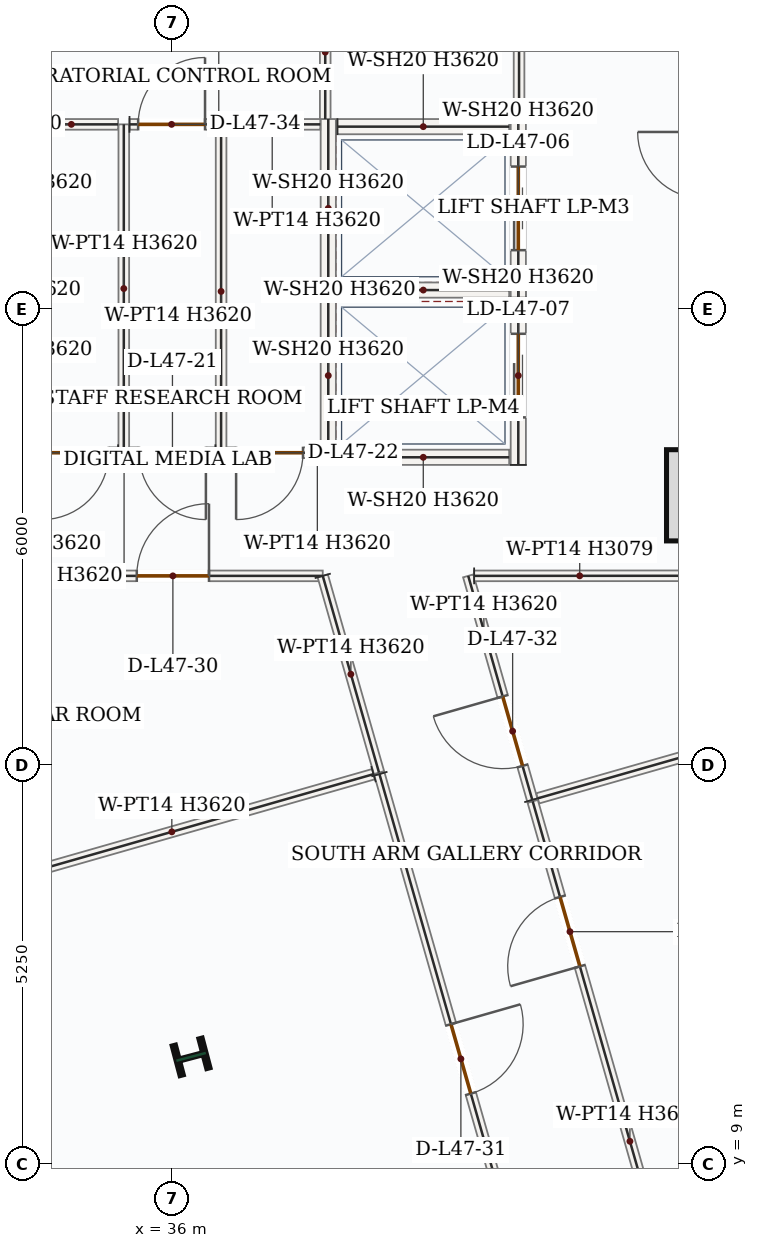
"""IFC4 building model, lengths in metres.
Left out: names, types, materials, properties, quantities, classifications, styles, units other than length and angle.
Written with IfcOpenShell. Run it as: python <this file> out.ifc"""

import sys

from ifc_helpers import new_model, si_unit, direction, frame, frame_2d, origin, origin_2d, place, context, subcontext, project, spatial, rectangle, i_section, extrude, source, transform, mapped, element, fill, save


model = new_model("IFC4")
c1 = context("Model", 3, precision=1e-05, world=origin(), true_north=direction((0.0, 1.0)))
c2 = subcontext(c1, "Body", "Model", "MODEL_VIEW")
j1 = project(units=[si_unit("LENGTHUNIT", "METRE"), si_unit("PLANEANGLEUNIT", "RADIAN")], contexts=[c1])
p1 = place(None, origin())
s1 = spatial("IfcSite", under=j1, at=p1, CompositionType="ELEMENT")
p2 = place(p1, origin())
s2 = spatial("IfcBuilding", under=s1, at=p2, CompositionType="ELEMENT")
p3 = place(p2, frame((0.0, 0.0, 201.9)))
s3 = spatial("IfcBuildingStorey", under=s2, at=p3, CompositionType="ELEMENT", Elevation=201.9)
m1 = source(origin(), c2, "Body", "SweptSolid", [
    extrude(rectangle(XDim=1.2, YDim=1.2, at=origin_2d()), origin(), (0.0, 0.0, 1.0), 3.9),
])
p4 = place(p3, frame((43.1, 17.8, 0.0), z_axis=(0.0, 0.0, 1.0), x_axis=(1.0, 0.0, 0.0)))
e1 = element("IfcColumn", 1, at=p4, inside=s3, PredefinedType="COLUMN", context=c2, shape_type="MappedRepresentation", body=[
    mapped(m1, transform((0.0, 0.0, 0.0), x_axis=(1.0, 0.0, 0.0), y_axis=(0.0, 1.0, 0.0), z_axis=(0.0, 0.0, 1.0), scale=1.0)),
])
m2 = source(origin(), c2, "Body", "SweptSolid", [
    extrude(i_section(OverallWidth=0.404, OverallDepth=0.407, WebThickness=0.027, FlangeThickness=0.044, FilletRadius=0.018, at=origin_2d()), origin(), (0.0, 0.0, 1.0), 3.9),
])
p5 = place(p3, frame((36.245, 10.412, 0.0), z_axis=(0.0, 0.0, 1.0), x_axis=(-0.255445757936, 0.966823388604, 0.0)))
e2 = element("IfcColumn", 2, at=p5, inside=s3, PredefinedType="COLUMN", context=c2, shape_type="MappedRepresentation", body=[
    mapped(m2, transform((0.0, 0.0, 0.0), x_axis=(1.0, 0.0, 0.0), y_axis=(0.0, 1.0, 0.0), z_axis=(0.0, 0.0, 1.0), scale=1.0)),
])
p6 = place(p3, frame((34.92, 6.555, 0.0), z_axis=(0.0, 0.0, 1.0), x_axis=(-0.27496352843, 0.961454657295, 0.0)))
e3 = element("IfcWall", 3, at=p6, inside=s3, PredefinedType="SOLIDWALL", context=c2, shape_type="SweptSolid", body=[
    extrude(rectangle(XDim=8.513, YDim=0.28, at=frame_2d((4.257, 0.0))), origin(), (0.0, 0.0, 1.0), 3.62),
])
p7 = place(p6, frame((3.357, 0.0, 0.85)))
e4 = element("IfcOpeningElement", 4, at=p7, cuts=e3, PredefinedType="OPENING", context=c2, shape_type="SweptSolid", body=[
    extrude(rectangle(XDim=1.8, YDim=1.75, at=frame_2d((0.9, 0.875))), frame((0.0, 0.15, 0.0), z_axis=(0.0, -1.0, 0.0), x_axis=(1.0, 0.0, 0.0)), (0.0, 0.0, 1.0), 0.3),
])
m3 = source(origin(), c2, "Body", "SweptSolid", [
    extrude(rectangle(XDim=2.35, YDim=0.2, at=frame_2d((1.175, 0.0))), origin(), (0.0, 0.0, 1.0), 3.62),
])
p8 = place(p3, frame((38.05, 20.4, 0.0), z_axis=(0.0, 0.0, 1.0), x_axis=(0.0, 1.0, 0.0)))
e5 = element("IfcWall", 5, at=p8, inside=s3, PredefinedType="SOLIDWALL", context=c2, shape_type="MappedRepresentation", body=[
    mapped(m3, transform((0.0, 0.0, 0.0), x_axis=(1.0, 0.0, 0.0), y_axis=(0.0, 1.0, 0.0), z_axis=(0.0, 0.0, 1.0), scale=1.0)),
])
p9 = place(p3, frame((40.55, 20.4, 0.0), z_axis=(0.0, 0.0, 1.0), x_axis=(0.0, 1.0, 0.0)))
e6 = element("IfcWall", 6, at=p9, inside=s3, PredefinedType="SOLIDWALL", context=c2, shape_type="SweptSolid", body=[
    extrude(rectangle(XDim=2.35, YDim=0.2, at=frame_2d((1.175, 0.0))), origin(), (0.0, 0.0, 1.0), 3.62),
])
p10 = place(p9, frame((0.625, 0.0, 0.0)))
e7 = element("IfcOpeningElement", 7, at=p10, cuts=e6, PredefinedType="OPENING", context=c2, shape_type="SweptSolid", body=[
    extrude(rectangle(XDim=1.1, YDim=2.15, at=frame_2d((0.55, 1.075))), frame((0.0, 0.11, 0.0), z_axis=(0.0, -1.0, 0.0), x_axis=(1.0, 0.0, 0.0)), (0.0, 0.0, 1.0), 0.22),
])
m4 = source(origin(), c2, "Body", "SweptSolid", [
    extrude(rectangle(XDim=2.26, YDim=0.2, at=frame_2d((1.13, 0.0))), origin(), (0.0, 0.0, 1.0), 3.62),
])
for number, where, z_axis, x_axis in (
    (8, (38.17, 20.5, 0.0), (0.0, 0.0, 1.0), (1.0, 0.0, 0.0)),
    (9, (38.17, 22.65, 0.0), (0.0, 0.0, 1.0), (1.0, 0.0, 0.0)),
):
    element("IfcWall", number, at=place(p3, frame(where, z_axis=z_axis, x_axis=x_axis)), inside=s3, PredefinedType="SOLIDWALL", context=c2, shape_type="MappedRepresentation", body=[
        mapped(m4, transform((0.0, 0.0, 0.0), x_axis=(1.0, 0.0, 0.0), y_axis=(0.0, 1.0, 0.0), z_axis=(0.0, 0.0, 1.0), scale=1.0)),
    ])
p11 = place(p3, frame((38.05, 18.2, 0.0), z_axis=(0.0, 0.0, 1.0), x_axis=(0.0, 1.0, 0.0)))
e10 = element("IfcWall", 10, at=p11, inside=s3, PredefinedType="SOLIDWALL", context=c2, shape_type="MappedRepresentation", body=[
    mapped(m3, transform((0.0, 0.0, 0.0), x_axis=(1.0, 0.0, 0.0), y_axis=(0.0, 1.0, 0.0), z_axis=(0.0, 0.0, 1.0), scale=1.0)),
])
p12 = place(p3, frame((40.55, 18.2, 0.0), z_axis=(0.0, 0.0, 1.0), x_axis=(0.0, 1.0, 0.0)))
e11 = element("IfcWall", 11, at=p12, inside=s3, PredefinedType="SOLIDWALL", context=c2, shape_type="SweptSolid", body=[
    extrude(rectangle(XDim=2.35, YDim=0.2, at=frame_2d((1.175, 0.0))), origin(), (0.0, 0.0, 1.0), 3.62),
])
p13 = place(p12, frame((0.625, 0.0, 0.0)))
e12 = element("IfcOpeningElement", 12, at=p13, cuts=e11, PredefinedType="OPENING", context=c2, shape_type="SweptSolid", body=[
    extrude(rectangle(XDim=1.1, YDim=2.15, at=frame_2d((0.55, 1.075))), frame((0.0, 0.11, 0.0), z_axis=(0.0, -1.0, 0.0), x_axis=(1.0, 0.0, 0.0)), (0.0, 0.0, 1.0), 0.22),
])
p14 = place(p3, frame((38.17, 18.3, 0.0), z_axis=(0.0, 0.0, 1.0), x_axis=(1.0, 0.0, 0.0)))
e13 = element("IfcWall", 13, at=p14, inside=s3, PredefinedType="SOLIDWALL", context=c2, shape_type="MappedRepresentation", body=[
    mapped(m4, transform((0.0, 0.0, 0.0), x_axis=(1.0, 0.0, 0.0), y_axis=(0.0, 1.0, 0.0), z_axis=(0.0, 0.0, 1.0), scale=1.0)),
])
m5 = source(origin(), c2, "Body", "SweptSolid", [
    extrude(rectangle(XDim=4.32, YDim=0.14, at=frame_2d((2.16, 0.0))), origin(), (0.0, 0.0, 1.0), 3.62),
])
p15 = place(p3, frame((35.36, 18.36, 0.0), z_axis=(0.0, 0.0, 1.0), x_axis=(0.0, 1.0, 0.0)))
e14 = element("IfcWall", 14, at=p15, inside=s3, PredefinedType="PARTITIONING", context=c2, shape_type="MappedRepresentation", body=[
    mapped(m5, transform((0.0, 0.0, 0.0), x_axis=(1.0, 0.0, 0.0), y_axis=(0.0, 1.0, 0.0), z_axis=(0.0, 0.0, 1.0), scale=1.0)),
])
p16 = place(p3, frame((35.435, 22.68, 0.0), z_axis=(0.0, 0.0, 1.0), x_axis=(1.0, 0.0, 0.0)))
e15 = element("IfcWall", 15, at=p16, inside=s3, PredefinedType="PARTITIONING", context=c2, shape_type="SweptSolid", body=[
    extrude(rectangle(XDim=1.205, YDim=0.14, at=frame_2d((0.603, 0.0))), origin(), (0.0, 0.0, 1.0), 3.62),
])
p17 = place(p16, frame((0.114, 0.0, 0.0)))
e16 = element("IfcOpeningElement", 16, at=p17, cuts=e15, PredefinedType="OPENING", context=c2, shape_type="SweptSolid", body=[
    extrude(rectangle(XDim=0.88, YDim=2.1, at=frame_2d((0.44, 1.05))), frame((0.0, 0.08, 0.0), z_axis=(0.0, -1.0, 0.0), x_axis=(1.0, 0.0, 0.0)), (0.0, 0.0, 1.0), 0.16),
])
m6 = source(origin(), c2, "Body", "SweptSolid", [
    extrude(rectangle(XDim=4.245, YDim=0.14, at=frame_2d((2.123, 0.0))), origin(), (0.0, 0.0, 1.0), 3.62),
])
p18 = place(p3, frame((36.64, 22.605, 0.0), z_axis=(0.0, 0.0, 1.0), x_axis=(0.0, -1.0, 0.0)))
e17 = element("IfcWall", 17, at=p18, inside=s3, PredefinedType="PARTITIONING", context=c2, shape_type="MappedRepresentation", body=[
    mapped(m6, transform((0.0, 0.0, 0.0), x_axis=(1.0, 0.0, 0.0), y_axis=(0.0, 1.0, 0.0), z_axis=(0.0, 0.0, 1.0), scale=1.0)),
])
p19 = place(p3, frame((36.565, 18.36, 0.0), z_axis=(0.0, 0.0, 1.0), x_axis=(-1.0, 0.0, 0.0)))
e18 = element("IfcWall", 18, at=p19, inside=s3, PredefinedType="PARTITIONING", context=c2, shape_type="SweptSolid", body=[
    extrude(rectangle(XDim=1.13, YDim=0.14, at=frame_2d((0.565, 0.0))), origin(), (0.0, 0.0, 1.0), 3.62),
])
p20 = place(p19, frame((0.125, 0.0, 0.0)))
e19 = element("IfcOpeningElement", 19, at=p20, cuts=e18, PredefinedType="OPENING", context=c2, shape_type="SweptSolid", body=[
    extrude(rectangle(XDim=0.88, YDim=2.1, at=frame_2d((0.44, 1.05))), frame((0.0, 0.08, 0.0), z_axis=(0.0, -1.0, 0.0), x_axis=(1.0, 0.0, 0.0)), (0.0, 0.0, 1.0), 0.16),
])
m7 = source(origin(), c2, "Body", "SweptSolid", [
    extrude(rectangle(XDim=1.23, YDim=0.14, at=frame_2d((0.615, 0.0))), origin(), (0.0, 0.0, 1.0), 3.62),
])
p21 = place(p3, frame((34.055, 22.68, 0.0), z_axis=(0.0, 0.0, 1.0), x_axis=(1.0, 0.0, 0.0)))
e20 = element("IfcWall", 20, at=p21, inside=s3, PredefinedType="PARTITIONING", context=c2, shape_type="MappedRepresentation", body=[
    mapped(m7, transform((0.0, 0.0, 0.0), x_axis=(1.0, 0.0, 0.0), y_axis=(0.0, 1.0, 0.0), z_axis=(0.0, 0.0, 1.0), scale=1.0)),
])
p22 = place(p3, frame((35.285, 18.36, 0.0), z_axis=(0.0, 0.0, 1.0), x_axis=(-1.0, 0.0, 0.0)))
e21 = element("IfcWall", 21, at=p22, inside=s3, PredefinedType="PARTITIONING", context=c2, shape_type="SweptSolid", body=[
    extrude(rectangle(XDim=1.23, YDim=0.14, at=frame_2d((0.615, 0.0))), origin(), (0.0, 0.0, 1.0), 3.62),
])
p23 = place(p22, frame((0.123, 0.0, 0.0)))
e22 = element("IfcOpeningElement", 22, at=p23, cuts=e21, PredefinedType="OPENING", context=c2, shape_type="SweptSolid", body=[
    extrude(rectangle(XDim=0.88, YDim=2.1, at=frame_2d((0.44, 1.05))), frame((0.0, 0.08, 0.0), z_axis=(0.0, -1.0, 0.0), x_axis=(1.0, 0.0, 0.0)), (0.0, 0.0, 1.0), 0.16),
])
m8 = source(origin(), c2, "Body", "SweptSolid", [
    extrude(rectangle(XDim=1.265, YDim=0.14, at=frame_2d((0.633, 0.0))), origin(), (0.0, 0.0, 1.0), 3.62),
])
p24 = place(p3, frame((36.68, 22.68, 0.0), z_axis=(0.0, 0.0, 1.0), x_axis=(1.0, 0.0, 0.0)))
e23 = element("IfcWall", 23, at=p24, inside=s3, PredefinedType="PARTITIONING", context=c2, shape_type="MappedRepresentation", body=[
    mapped(m8, transform((0.0, 0.0, 0.0), x_axis=(1.0, 0.0, 0.0), y_axis=(0.0, 1.0, 0.0), z_axis=(0.0, 0.0, 1.0), scale=1.0)),
])
p25 = place(p3, frame((37.945, 18.36, 0.0), z_axis=(0.0, 0.0, 1.0), x_axis=(-1.0, 0.0, 0.0)))
e24 = element("IfcWall", 24, at=p25, inside=s3, PredefinedType="PARTITIONING", context=c2, shape_type="SweptSolid", body=[
    extrude(rectangle(XDim=1.23, YDim=0.14, at=frame_2d((0.615, 0.0))), origin(), (0.0, 0.0, 1.0), 3.62),
])
p26 = place(p25, frame((0.228, 0.0, 0.0)))
e25 = element("IfcOpeningElement", 25, at=p26, cuts=e24, PredefinedType="OPENING", context=c2, shape_type="SweptSolid", body=[
    extrude(rectangle(XDim=0.88, YDim=2.1, at=frame_2d((0.44, 1.05))), frame((0.0, 0.08, 0.0), z_axis=(0.0, -1.0, 0.0), x_axis=(1.0, 0.0, 0.0)), (0.0, 0.0, 1.0), 0.16),
])
m9 = source(origin(), c2, "Body", "SweptSolid", [
    extrude(rectangle(XDim=1.76, YDim=0.14, at=frame_2d((0.88, 0.0))), origin(), (0.0, 0.0, 1.0), 3.62),
])
p27 = place(p3, frame((38.01, 24.51, 0.0), z_axis=(0.0, 0.0, 1.0), x_axis=(0.0, -1.0, 0.0)))
e26 = element("IfcWall", 26, at=p27, inside=s3, PredefinedType="PARTITIONING", context=c2, shape_type="MappedRepresentation", body=[
    mapped(m9, transform((0.0, 0.0, 0.0), x_axis=(1.0, 0.0, 0.0), y_axis=(0.0, 1.0, 0.0), z_axis=(0.0, 0.0, 1.0), scale=1.0)),
])
m10 = source(origin(), c2, "Body", "SweptSolid", [
    extrude(rectangle(XDim=3.035, YDim=0.14, at=frame_2d((1.518, 0.0))), origin(), (0.0, 0.0, 1.0), 3.62),
])
p28 = place(p3, frame((40.56, 25.785, 0.0), z_axis=(0.0, 0.0, 1.0), x_axis=(0.0, -1.0, 0.0)))
e27 = element("IfcWall", 27, at=p28, inside=s3, PredefinedType="PARTITIONING", context=c2, shape_type="MappedRepresentation", body=[
    mapped(m10, transform((0.0, 0.0, 0.0), x_axis=(1.0, 0.0, 0.0), y_axis=(0.0, 1.0, 0.0), z_axis=(0.0, 0.0, 1.0), scale=1.0)),
])
p29 = place(p3, frame((40.734, 13.792, 0.0), z_axis=(0.0, 0.0, 1.0), x_axis=(-0.274984067599, 0.961448783122, 0.0)))
e28 = element("IfcWall", 28, at=p29, inside=s3, PredefinedType="PARTITIONING", context=c2, shape_type="SweptSolid", body=[
    extrude(rectangle(XDim=3.066, YDim=0.14, at=frame_2d((1.533, 0.0))), origin(), (0.0, 0.0, 1.0), 3.62),
])
p30 = place(p29, frame((0.465, 0.0, 0.0)))
e29 = element("IfcOpeningElement", 29, at=p30, cuts=e28, PredefinedType="OPENING", context=c2, shape_type="SweptSolid", body=[
    extrude(rectangle(XDim=0.95, YDim=2.15, at=frame_2d((0.475, 1.075))), frame((0.0, 0.08, 0.0), z_axis=(0.0, -1.0, 0.0), x_axis=(1.0, 0.0, 0.0)), (0.0, 0.0, 1.0), 0.16),
])
m11 = source(origin(), c2, "Body", "SweptSolid", [
    extrude(rectangle(XDim=2.778, YDim=0.14, at=frame_2d((1.389, 0.0))), origin(), (0.0, 0.0, 1.0), 3.079),
])
p31 = place(p3, frame((39.969, 16.74, 0.0), z_axis=(0.0, 0.0, 1.0), x_axis=(0.999999903427, 0.000439483125, 0.0)))
e30 = element("IfcWall", 30, at=p31, inside=s3, PredefinedType="PARTITIONING", context=c2, shape_type="MappedRepresentation", body=[
    mapped(m11, transform((0.0, 0.0, 0.0), x_axis=(1.0, 0.0, 0.0), y_axis=(0.0, 1.0, 0.0), z_axis=(0.0, 0.0, 1.0), scale=1.0)),
])
m12 = source(origin(), c2, "Body", "SweptSolid", [
    extrude(rectangle(XDim=10.785, YDim=0.14, at=frame_2d((5.393, 0.0))), origin(), (0.0, 0.0, 1.0), 3.079),
])
p32 = place(p3, frame((51.176, 16.779, 0.0), z_axis=(0.0, 0.0, 1.0), x_axis=(-0.961454726908, -0.274963285016, 0.0)))
e31 = element("IfcWall", 31, at=p32, inside=s3, PredefinedType="PARTITIONING", context=c2, shape_type="MappedRepresentation", body=[
    mapped(m12, transform((0.0, 0.0, 0.0), x_axis=(1.0, 0.0, 0.0), y_axis=(0.0, 1.0, 0.0), z_axis=(0.0, 0.0, 1.0), scale=1.0)),
])
p33 = place(p3, frame((30.225, 16.74, 0.0), z_axis=(0.0, 0.0, 1.0), x_axis=(1.0, 0.0, 0.0)))
e32 = element("IfcWall", 32, at=p33, inside=s3, PredefinedType="PARTITIONING", context=c2, shape_type="SweptSolid", body=[
    extrude(rectangle(XDim=7.753, YDim=0.14, at=frame_2d((3.876, 0.0))), origin(), (0.0, 0.0, 1.0), 3.62),
])
p34 = place(p33, frame((5.306, 0.0, 0.0)))
e33 = element("IfcOpeningElement", 33, at=p34, cuts=e32, PredefinedType="OPENING", context=c2, shape_type="SweptSolid", body=[
    extrude(rectangle(XDim=0.95, YDim=2.15, at=frame_2d((0.475, 1.075))), frame((0.0, 0.08, 0.0), z_axis=(0.0, -1.0, 0.0), x_axis=(1.0, 0.0, 0.0)), (0.0, 0.0, 1.0), 0.16),
])
m13 = source(origin(), c2, "Body", "SweptSolid", [
    extrude(rectangle(XDim=2.692, YDim=0.14, at=frame_2d((1.346, 0.0))), origin(), (0.0, 0.0, 1.0), 3.62),
])
p35 = place(p3, frame((37.977, 16.74, 0.0), z_axis=(0.0, 0.0, 1.0), x_axis=(0.27500862401, -0.961441759401, 0.0)))
e34 = element("IfcWall", 34, at=p35, inside=s3, PredefinedType="PARTITIONING", context=c2, shape_type="MappedRepresentation", body=[
    mapped(m13, transform((0.0, 0.0, 0.0), x_axis=(1.0, 0.0, 0.0), y_axis=(0.0, 1.0, 0.0), z_axis=(0.0, 0.0, 1.0), scale=1.0)),
])
m14 = source(origin(), c2, "Body", "SweptSolid", [
    extrude(rectangle(XDim=5.52, YDim=0.14, at=frame_2d((2.76, 0.0))), origin(), (0.0, 0.0, 1.0), 3.62),
])
p36 = place(p3, frame((38.646, 14.131, 0.0), z_axis=(0.0, 0.0, 1.0), x_axis=(-0.961455490798, -0.274960613933, 0.0)))
e35 = element("IfcWall", 35, at=p36, inside=s3, PredefinedType="PARTITIONING", context=c2, shape_type="MappedRepresentation", body=[
    mapped(m14, transform((0.0, 0.0, 0.0), x_axis=(1.0, 0.0, 0.0), y_axis=(0.0, 1.0, 0.0), z_axis=(0.0, 0.0, 1.0), scale=1.0)),
])
p37 = place(p3, frame((42.635, 7.144, 0.0), z_axis=(0.0, 0.0, 1.0), x_axis=(-0.274973646468, 0.96145176361, 0.0)))
e36 = element("IfcWall", 36, at=p37, inside=s3, PredefinedType="PARTITIONING", context=c2, shape_type="SweptSolid", body=[
    extrude(rectangle(XDim=6.895, YDim=0.14, at=frame_2d((3.448, 0.0))), origin(), (0.0, 0.0, 1.0), 3.62),
])
p38 = place(p37, frame((4.637, 0.0, 0.0)))
e37 = element("IfcOpeningElement", 37, at=p38, cuts=e36, PredefinedType="OPENING", context=c2, shape_type="SweptSolid", body=[
    extrude(rectangle(XDim=0.95, YDim=2.15, at=frame_2d((0.475, 1.075))), frame((0.0, 0.08, 0.0), z_axis=(0.0, -1.0, 0.0), x_axis=(1.0, 0.0, 0.0)), (0.0, 0.0, 1.0), 0.16),
])
p39 = place(p3, frame((38.723, 14.133, 0.0), z_axis=(0.0, 0.0, 1.0), x_axis=(0.274985856522, -0.96144827147, 0.0)))
e38 = element("IfcWall", 38, at=p39, inside=s3, PredefinedType="PARTITIONING", context=c2, shape_type="SweptSolid", body=[
    extrude(rectangle(XDim=7.795, YDim=0.14, at=frame_2d((3.897, 0.0))), origin(), (0.0, 0.0, 1.0), 3.62),
])
p40 = place(p39, frame((3.423, 0.0, 0.0)))
e39 = element("IfcOpeningElement", 39, at=p40, cuts=e38, PredefinedType="OPENING", context=c2, shape_type="SweptSolid", body=[
    extrude(rectangle(XDim=0.95, YDim=2.15, at=frame_2d((0.475, 1.075))), frame((0.0, 0.08, 0.0), z_axis=(0.0, -1.0, 0.0), x_axis=(1.0, 0.0, 0.0)), (0.0, 0.0, 1.0), 0.16),
])
m15 = source(origin(), c2, "Body", "SweptSolid", [
    extrude(rectangle(XDim=1.1, YDim=2.15, at=frame_2d((0.55, 1.075))), frame((0.0, 0.025, 0.0), z_axis=(0.0, -1.0, 0.0), x_axis=(1.0, 0.0, 0.0)), (0.0, 0.0, 1.0), 0.05),
])
p41 = place(p10, origin())
e40 = element("IfcDoor", 40, at=p41, inside=s3, OperationType="DOUBLE_DOOR_SLIDING", PredefinedType="DOOR", context=c2, shape_type="MappedRepresentation", body=[
    mapped(m15, transform((0.0, 0.0, 0.0), x_axis=(1.0, 0.0, 0.0), y_axis=(0.0, 1.0, 0.0), z_axis=(0.0, 0.0, 1.0), scale=1.0)),
])
fill(e7, e40)
p42 = place(p13, origin())
e41 = element("IfcDoor", 41, at=p42, inside=s3, OperationType="DOUBLE_DOOR_SLIDING", PredefinedType="DOOR", context=c2, shape_type="MappedRepresentation", body=[
    mapped(m15, transform((0.0, 0.0, 0.0), x_axis=(1.0, 0.0, 0.0), y_axis=(0.0, 1.0, 0.0), z_axis=(0.0, 0.0, 1.0), scale=1.0)),
])
fill(e12, e41)
m16 = source(origin(), c2, "Body", "SweptSolid", [
    extrude(rectangle(XDim=0.88, YDim=2.1, at=frame_2d((0.44, 1.05))), frame((0.0, 0.025, 0.0), z_axis=(0.0, -1.0, 0.0), x_axis=(1.0, 0.0, 0.0)), (0.0, 0.0, 1.0), 0.05),
])
p43 = place(p23, origin())
e42 = element("IfcDoor", 42, at=p43, inside=s3, OperationType="SINGLE_SWING_RIGHT", PredefinedType="DOOR", context=c2, shape_type="MappedRepresentation", body=[
    mapped(m16, transform((0.0, 0.0, 0.0), x_axis=(1.0, 0.0, 0.0), y_axis=(0.0, 1.0, 0.0), z_axis=(0.0, 0.0, 1.0), scale=1.0)),
])
fill(e22, e42)
p44 = place(p20, origin())
e43 = element("IfcDoor", 43, at=p44, inside=s3, OperationType="SINGLE_SWING_LEFT", PredefinedType="DOOR", context=c2, shape_type="MappedRepresentation", body=[
    mapped(m16, transform((0.0, 0.0, 0.0), x_axis=(1.0, 0.0, 0.0), y_axis=(0.0, 1.0, 0.0), z_axis=(0.0, 0.0, 1.0), scale=1.0)),
])
fill(e19, e43)
p45 = place(p26, origin())
e44 = element("IfcDoor", 44, at=p45, inside=s3, OperationType="SINGLE_SWING_RIGHT", PredefinedType="DOOR", context=c2, shape_type="MappedRepresentation", body=[
    mapped(m16, transform((0.0, 0.0, 0.0), x_axis=(1.0, 0.0, 0.0), y_axis=(0.0, 1.0, 0.0), z_axis=(0.0, 0.0, 1.0), scale=1.0)),
])
fill(e25, e44)
m17 = source(origin(), c2, "Body", "SweptSolid", [
    extrude(rectangle(XDim=0.95, YDim=2.15, at=frame_2d((0.475, 1.075))), frame((0.0, 0.025, 0.0), z_axis=(0.0, -1.0, 0.0), x_axis=(1.0, 0.0, 0.0)), (0.0, 0.0, 1.0), 0.05),
])
p46 = place(p34, origin())
e45 = element("IfcDoor", 45, at=p46, inside=s3, OperationType="SINGLE_SWING_RIGHT", PredefinedType="DOOR", context=c2, shape_type="MappedRepresentation", body=[
    mapped(m17, transform((0.0, 0.0, 0.0), x_axis=(1.0, 0.0, 0.0), y_axis=(0.0, 1.0, 0.0), z_axis=(0.0, 0.0, 1.0), scale=1.0)),
])
fill(e33, e45)
p47 = place(p40, origin())
e46 = element("IfcDoor", 46, at=p47, inside=s3, OperationType="SINGLE_SWING_LEFT", PredefinedType="DOOR", context=c2, shape_type="MappedRepresentation", body=[
    mapped(m17, transform((0.0, 0.0, 0.0), x_axis=(1.0, 0.0, 0.0), y_axis=(0.0, 1.0, 0.0), z_axis=(0.0, 0.0, 1.0), scale=1.0)),
])
fill(e39, e46)
p48 = place(p30, origin())
e47 = element("IfcDoor", 47, at=p48, inside=s3, OperationType="SINGLE_SWING_RIGHT", PredefinedType="DOOR", context=c2, shape_type="MappedRepresentation", body=[
    mapped(m17, transform((0.0, 0.0, 0.0), x_axis=(1.0, 0.0, 0.0), y_axis=(0.0, 1.0, 0.0), z_axis=(0.0, 0.0, 1.0), scale=1.0)),
])
fill(e29, e47)
p49 = place(p38, origin())
e48 = element("IfcDoor", 48, at=p49, inside=s3, OperationType="SINGLE_SWING_LEFT", PredefinedType="DOOR", context=c2, shape_type="MappedRepresentation", body=[
    mapped(m17, transform((0.0, 0.0, 0.0), x_axis=(1.0, 0.0, 0.0), y_axis=(0.0, 1.0, 0.0), z_axis=(0.0, 0.0, 1.0), scale=1.0)),
])
fill(e37, e48)
p50 = place(p17, origin())
e49 = element("IfcDoor", 49, at=p50, inside=s3, OperationType="SINGLE_SWING_RIGHT", PredefinedType="DOOR", context=c2, shape_type="MappedRepresentation", body=[
    mapped(m16, transform((0.0, 0.0, 0.0), x_axis=(1.0, 0.0, 0.0), y_axis=(0.0, 1.0, 0.0), z_axis=(0.0, 0.0, 1.0), scale=1.0)),
])
fill(e16, e49)
save(model, sys.argv[1])
